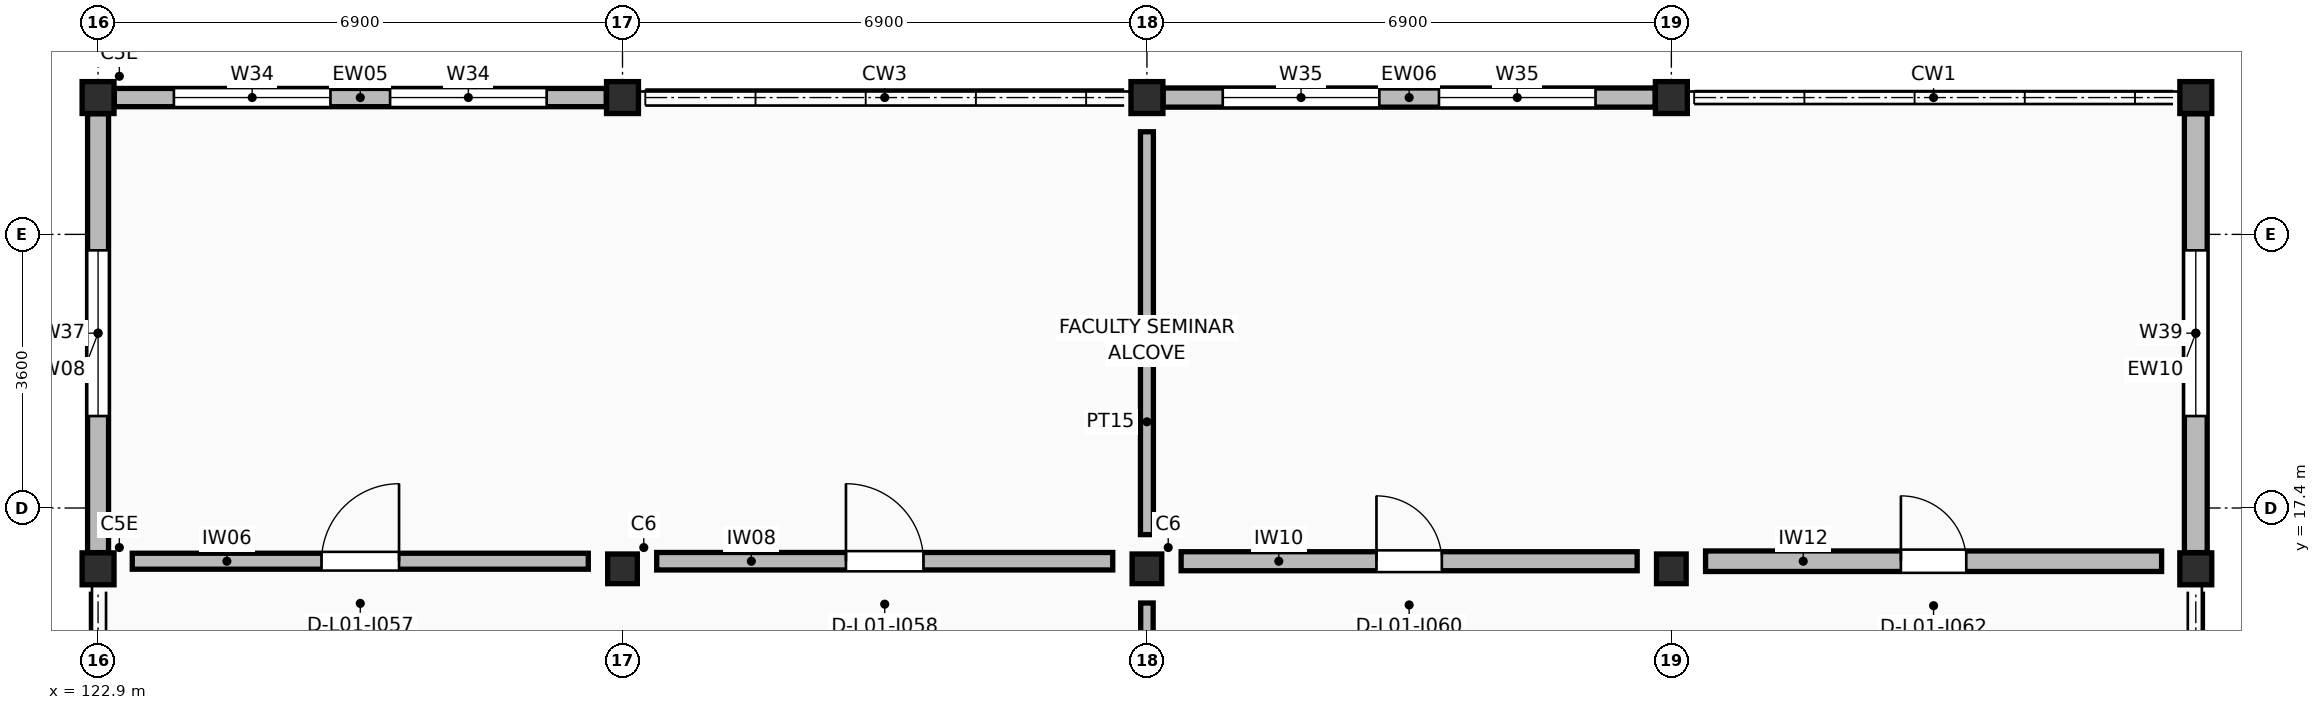
"""IFC4 building model, lengths in metres.
Left out: names, types, materials, properties, quantities, classifications, styles, units other than length and angle.
Written with IfcOpenShell. Run it as: python <this file> out.ifc"""

import sys

from ifc_helpers import new_model, si_unit, direction, frame, frame_2d, origin, origin_2d, place, context, subcontext, project, spatial, rectangle, extrude, element, fill, save


model = new_model("IFC4")
c1 = context("Model", 3, precision=1e-05, world=origin(), true_north=direction((0.0, 1.0)))
c2 = subcontext(c1, "Body", "Model", "MODEL_VIEW")
j1 = project(units=[si_unit("LENGTHUNIT", "METRE"), si_unit("PLANEANGLEUNIT", "RADIAN")], contexts=[c1])
p1 = place(None, origin())
s1 = spatial("IfcSite", under=j1, at=p1, CompositionType="ELEMENT")
p2 = place(p1, origin())
s2 = spatial("IfcBuilding", under=s1, at=p2, CompositionType="ELEMENT")
p3 = place(p2, frame((0.0, 0.0, 4.42)))
s3 = spatial("IfcBuildingStorey", under=s2, at=p3, CompositionType="ELEMENT", Elevation=4.42)
for number, where, z_axis, x_axis in (
    (1, (122.9, 16.6, 0.0), (0.0, 0.0, 1.0), (1.0, 0.0, 0.0)),
    (2, (122.9, 22.8, 0.0), (0.0, 0.0, 1.0), (1.0, 0.0, 0.0)),
):
    element("IfcColumn", number, at=place(p3, frame(where, z_axis=z_axis, x_axis=x_axis)), inside=s3, PredefinedType="COLUMN", context=c2, shape_type="SweptSolid", body=[
        extrude(rectangle(XDim=0.42, YDim=0.42, at=origin_2d()), origin(), (0.0, 0.0, 1.0), 3.74),
    ])
p4 = place(p3, frame((129.8, 16.6, 0.0), z_axis=(0.0, 0.0, 1.0), x_axis=(1.0, 0.0, 0.0)))
e3 = element("IfcColumn", 3, at=p4, inside=s3, PredefinedType="COLUMN", context=c2, shape_type="SweptSolid", body=[
    extrude(rectangle(XDim=0.39, YDim=0.39, at=origin_2d()), origin(), (0.0, 0.0, 1.0), 3.74),
])
p5 = place(p3, frame((129.8, 22.8, 0.0), z_axis=(0.0, 0.0, 1.0), x_axis=(1.0, 0.0, 0.0)))
e4 = element("IfcColumn", 4, at=p5, inside=s3, PredefinedType="COLUMN", context=c2, shape_type="SweptSolid", body=[
    extrude(rectangle(XDim=0.42, YDim=0.42, at=origin_2d()), origin(), (0.0, 0.0, 1.0), 3.74),
])
p6 = place(p3, frame((136.7, 16.6, 0.0), z_axis=(0.0, 0.0, 1.0), x_axis=(1.0, 0.0, 0.0)))
e5 = element("IfcColumn", 5, at=p6, inside=s3, PredefinedType="COLUMN", context=c2, shape_type="SweptSolid", body=[
    extrude(rectangle(XDim=0.39, YDim=0.39, at=origin_2d()), origin(), (0.0, 0.0, 1.0), 3.74),
])
p7 = place(p3, frame((136.7, 22.8, 0.0), z_axis=(0.0, 0.0, 1.0), x_axis=(1.0, 0.0, 0.0)))
e6 = element("IfcColumn", 6, at=p7, inside=s3, PredefinedType="COLUMN", context=c2, shape_type="SweptSolid", body=[
    extrude(rectangle(XDim=0.42, YDim=0.42, at=origin_2d()), origin(), (0.0, 0.0, 1.0), 3.74),
])
p8 = place(p3, frame((143.6, 16.6, 0.0), z_axis=(0.0, 0.0, 1.0), x_axis=(1.0, 0.0, 0.0)))
e7 = element("IfcColumn", 7, at=p8, inside=s3, PredefinedType="COLUMN", context=c2, shape_type="SweptSolid", body=[
    extrude(rectangle(XDim=0.39, YDim=0.39, at=origin_2d()), origin(), (0.0, 0.0, 1.0), 3.74),
])
for number, where, z_axis, x_axis in (
    (8, (143.6, 22.8, 0.0), (0.0, 0.0, 1.0), (1.0, 0.0, 0.0)),
    (9, (150.5, 16.6, 0.0), (0.0, 0.0, 1.0), (1.0, 0.0, 0.0)),
    (10, (150.5, 22.8, 0.0), (0.0, 0.0, 1.0), (1.0, 0.0, 0.0)),
):
    element("IfcColumn", number, at=place(p3, frame(where, z_axis=z_axis, x_axis=x_axis)), inside=s3, PredefinedType="COLUMN", context=c2, shape_type="SweptSolid", body=[
        extrude(rectangle(XDim=0.42, YDim=0.42, at=origin_2d()), origin(), (0.0, 0.0, 1.0), 3.74),
    ])
p9 = place(p3, frame((123.113, 22.8, 0.0), z_axis=(0.0, 0.0, 1.0), x_axis=(1.0, 0.0, 0.0)))
e11 = element("IfcWall", 11, at=p9, inside=s3, PredefinedType="STANDARD", context=c2, shape_type="SweptSolid", body=[
    extrude(rectangle(XDim=6.474, YDim=0.24, at=frame_2d((3.237, 0.0))), origin(), (0.0, 0.0, 1.0), 2.78),
])
p10 = place(p9, frame((0.785, 0.0, 0.95)))
e12 = element("IfcOpeningElement", 12, at=p10, cuts=e11, PredefinedType="OPENING", context=c2, shape_type="SweptSolid", body=[
    extrude(rectangle(XDim=2.06, YDim=1.3, at=frame_2d((1.03, 0.65))), frame((0.0, 0.13, 0.0), z_axis=(0.0, -1.0, 0.0), x_axis=(1.0, 0.0, 0.0)), (0.0, 0.0, 1.0), 0.26),
])
p11 = place(p9, frame((3.629, 0.0, 0.95)))
e13 = element("IfcOpeningElement", 13, at=p11, cuts=e11, PredefinedType="OPENING", context=c2, shape_type="SweptSolid", body=[
    extrude(rectangle(XDim=2.06, YDim=1.3, at=frame_2d((1.03, 0.65))), frame((0.0, 0.13, 0.0), z_axis=(0.0, -1.0, 0.0), x_axis=(1.0, 0.0, 0.0)), (0.0, 0.0, 1.0), 0.26),
])
p12 = place(p3, frame((136.913, 22.8, 0.0), z_axis=(0.0, 0.0, 1.0), x_axis=(1.0, 0.0, 0.0)))
e14 = element("IfcWall", 14, at=p12, inside=s3, PredefinedType="STANDARD", context=c2, shape_type="SweptSolid", body=[
    extrude(rectangle(XDim=6.474, YDim=0.252, at=frame_2d((3.237, 0.0))), origin(), (0.0, 0.0, 1.0), 2.78),
])
p13 = place(p12, frame((0.785, 0.0, 0.95)))
e15 = element("IfcOpeningElement", 15, at=p13, cuts=e14, PredefinedType="OPENING", context=c2, shape_type="SweptSolid", body=[
    extrude(rectangle(XDim=2.06, YDim=1.45, at=frame_2d((1.03, 0.725))), frame((0.0, 0.136, 0.0), z_axis=(0.0, -1.0, 0.0), x_axis=(1.0, 0.0, 0.0)), (0.0, 0.0, 1.0), 0.272),
])
p14 = place(p12, frame((3.629, 0.0, 0.95)))
e16 = element("IfcOpeningElement", 16, at=p14, cuts=e14, PredefinedType="OPENING", context=c2, shape_type="SweptSolid", body=[
    extrude(rectangle(XDim=2.06, YDim=1.45, at=frame_2d((1.03, 0.725))), frame((0.0, 0.136, 0.0), z_axis=(0.0, -1.0, 0.0), x_axis=(1.0, 0.0, 0.0)), (0.0, 0.0, 1.0), 0.272),
])
p15 = place(p3, frame((122.9, 16.813, 0.0), z_axis=(0.0, 0.0, 1.0), x_axis=(0.0, 1.0, 0.0)))
e17 = element("IfcWall", 17, at=p15, inside=s3, PredefinedType="STANDARD", context=c2, shape_type="SweptSolid", body=[
    extrude(rectangle(XDim=5.774, YDim=0.276, at=frame_2d((2.887, 0.0))), origin(), (0.0, 0.0, 1.0), 2.78),
])
p16 = place(p15, frame((1.797, 0.0, 0.95)))
e18 = element("IfcOpeningElement", 18, at=p16, cuts=e17, PredefinedType="OPENING", context=c2, shape_type="SweptSolid", body=[
    extrude(rectangle(XDim=2.18, YDim=1.15, at=frame_2d((1.09, 0.575))), frame((0.0, 0.148, 0.0), z_axis=(0.0, -1.0, 0.0), x_axis=(1.0, 0.0, 0.0)), (0.0, 0.0, 1.0), 0.296),
])
p17 = place(p3, frame((150.5, 16.813, 0.0), z_axis=(0.0, 0.0, 1.0), x_axis=(0.0, 1.0, 0.0)))
e19 = element("IfcWall", 19, at=p17, inside=s3, PredefinedType="STANDARD", context=c2, shape_type="SweptSolid", body=[
    extrude(rectangle(XDim=5.774, YDim=0.3, at=frame_2d((2.887, 0.0))), origin(), (0.0, 0.0, 1.0), 2.78),
])
p18 = place(p17, frame((1.797, 0.0, 0.95)))
e20 = element("IfcOpeningElement", 20, at=p18, cuts=e19, PredefinedType="OPENING", context=c2, shape_type="SweptSolid", body=[
    extrude(rectangle(XDim=2.18, YDim=1.45, at=frame_2d((1.09, 0.725))), frame((0.0, 0.16, 0.0), z_axis=(0.0, -1.0, 0.0), x_axis=(1.0, 0.0, 0.0)), (0.0, 0.0, 1.0), 0.32),
])
p19 = place(p3, frame((123.35, 16.7, 0.0), z_axis=(0.0, 0.0, 1.0), x_axis=(1.0, 0.0, 0.0)))
e21 = element("IfcWall", 21, at=p19, inside=s3, PredefinedType="STANDARD", context=c2, shape_type="SweptSolid", body=[
    extrude(rectangle(XDim=6.0, YDim=0.21, at=frame_2d((3.0, 0.0))), origin(), (0.0, 0.0, 1.0), 2.75),
])
p20 = place(p19, frame((2.49, 0.0, 0.0)))
e22 = element("IfcOpeningElement", 22, at=p20, cuts=e21, PredefinedType="OPENING", context=c2, shape_type="SweptSolid", body=[
    extrude(rectangle(XDim=1.02, YDim=2.12, at=frame_2d((0.51, 1.06))), frame((0.0, 0.115, 0.0), z_axis=(0.0, -1.0, 0.0), x_axis=(1.0, 0.0, 0.0)), (0.0, 0.0, 1.0), 0.23),
])
p21 = place(p3, frame((130.25, 16.7, 0.0), z_axis=(0.0, 0.0, 1.0), x_axis=(1.0, 0.0, 0.0)))
e23 = element("IfcWall", 23, at=p21, inside=s3, PredefinedType="STANDARD", context=c2, shape_type="SweptSolid", body=[
    extrude(rectangle(XDim=6.0, YDim=0.23, at=frame_2d((3.0, 0.0))), origin(), (0.0, 0.0, 1.0), 2.75),
])
p22 = place(p21, frame((2.49, 0.0, 0.0)))
e24 = element("IfcOpeningElement", 24, at=p22, cuts=e23, PredefinedType="OPENING", context=c2, shape_type="SweptSolid", body=[
    extrude(rectangle(XDim=1.02, YDim=2.18, at=frame_2d((0.51, 1.09))), frame((0.0, 0.125, 0.0), z_axis=(0.0, -1.0, 0.0), x_axis=(1.0, 0.0, 0.0)), (0.0, 0.0, 1.0), 0.25),
])
p23 = place(p3, frame((137.15, 16.7, 0.0), z_axis=(0.0, 0.0, 1.0), x_axis=(1.0, 0.0, 0.0)))
e25 = element("IfcWall", 25, at=p23, inside=s3, PredefinedType="STANDARD", context=c2, shape_type="SweptSolid", body=[
    extrude(rectangle(XDim=6.0, YDim=0.25, at=frame_2d((3.0, 0.0))), origin(), (0.0, 0.0, 1.0), 2.75),
])
p24 = place(p23, frame((2.57, 0.0, 0.0)))
e26 = element("IfcOpeningElement", 26, at=p24, cuts=e25, PredefinedType="OPENING", context=c2, shape_type="SweptSolid", body=[
    extrude(rectangle(XDim=0.86, YDim=2.06, at=frame_2d((0.43, 1.03))), frame((0.0, 0.135, 0.0), z_axis=(0.0, -1.0, 0.0), x_axis=(1.0, 0.0, 0.0)), (0.0, 0.0, 1.0), 0.27),
])
p25 = place(p3, frame((144.05, 16.7, 0.0), z_axis=(0.0, 0.0, 1.0), x_axis=(1.0, 0.0, 0.0)))
e27 = element("IfcWall", 27, at=p25, inside=s3, PredefinedType="STANDARD", context=c2, shape_type="SweptSolid", body=[
    extrude(rectangle(XDim=6.0, YDim=0.27, at=frame_2d((3.0, 0.0))), origin(), (0.0, 0.0, 1.0), 2.75),
])
p26 = place(p25, frame((2.57, 0.0, 0.0)))
e28 = element("IfcOpeningElement", 28, at=p26, cuts=e27, PredefinedType="OPENING", context=c2, shape_type="SweptSolid", body=[
    extrude(rectangle(XDim=0.86, YDim=2.18, at=frame_2d((0.43, 1.09))), frame((0.0, 0.145, 0.0), z_axis=(0.0, -1.0, 0.0), x_axis=(1.0, 0.0, 0.0)), (0.0, 0.0, 1.0), 0.29),
])
p27 = place(p3, frame((136.7, 10.85, 0.0), z_axis=(0.0, 0.0, 1.0), x_axis=(0.0, 1.0, 0.0)))
e29 = element("IfcWall", 29, at=p27, inside=s3, PredefinedType="PARTITIONING", context=c2, shape_type="SweptSolid", body=[
    extrude(rectangle(XDim=5.3, YDim=0.164, at=frame_2d((2.65, 0.0))), origin(), (0.0, 0.0, 1.0), 2.75),
])
p28 = place(p3, frame((136.7, 17.05, 0.0), z_axis=(0.0, 0.0, 1.0), x_axis=(0.0, 1.0, 0.0)))
e30 = element("IfcWall", 30, at=p28, inside=s3, PredefinedType="PARTITIONING", context=c2, shape_type="SweptSolid", body=[
    extrude(rectangle(XDim=5.3, YDim=0.17, at=frame_2d((2.65, 0.0))), origin(), (0.0, 0.0, 1.0), 2.75),
])
p29 = place(p10, origin())
e31 = element("IfcWindow", 31, at=p29, inside=s3, PartitioningType="SINGLE_PANEL", PredefinedType="WINDOW", context=c2, shape_type="SweptSolid", body=[
    extrude(rectangle(XDim=2.06, YDim=1.3, at=frame_2d((1.03, 0.65))), frame((0.0, 0.03, 0.0), z_axis=(0.0, -1.0, 0.0), x_axis=(1.0, 0.0, 0.0)), (0.0, 0.0, 1.0), 0.06),
])
fill(e12, e31)
p30 = place(p11, origin())
e32 = element("IfcWindow", 32, at=p30, inside=s3, PartitioningType="SINGLE_PANEL", PredefinedType="WINDOW", context=c2, shape_type="SweptSolid", body=[
    extrude(rectangle(XDim=2.06, YDim=1.3, at=frame_2d((1.03, 0.65))), frame((0.0, 0.03, 0.0), z_axis=(0.0, -1.0, 0.0), x_axis=(1.0, 0.0, 0.0)), (0.0, 0.0, 1.0), 0.06),
])
fill(e13, e32)
p31 = place(p13, origin())
e33 = element("IfcWindow", 33, at=p31, inside=s3, PartitioningType="SINGLE_PANEL", PredefinedType="WINDOW", context=c2, shape_type="SweptSolid", body=[
    extrude(rectangle(XDim=2.06, YDim=1.45, at=frame_2d((1.03, 0.725))), frame((0.0, 0.03, 0.0), z_axis=(0.0, -1.0, 0.0), x_axis=(1.0, 0.0, 0.0)), (0.0, 0.0, 1.0), 0.06),
])
fill(e15, e33)
p32 = place(p14, origin())
e34 = element("IfcWindow", 34, at=p32, inside=s3, PartitioningType="SINGLE_PANEL", PredefinedType="WINDOW", context=c2, shape_type="SweptSolid", body=[
    extrude(rectangle(XDim=2.06, YDim=1.45, at=frame_2d((1.03, 0.725))), frame((0.0, 0.03, 0.0), z_axis=(0.0, -1.0, 0.0), x_axis=(1.0, 0.0, 0.0)), (0.0, 0.0, 1.0), 0.06),
])
fill(e16, e34)
p33 = place(p16, origin())
e35 = element("IfcWindow", 35, at=p33, inside=s3, PartitioningType="SINGLE_PANEL", PredefinedType="WINDOW", context=c2, shape_type="SweptSolid", body=[
    extrude(rectangle(XDim=2.18, YDim=1.15, at=frame_2d((1.09, 0.575))), frame((0.0, 0.03, 0.0), z_axis=(0.0, -1.0, 0.0), x_axis=(1.0, 0.0, 0.0)), (0.0, 0.0, 1.0), 0.06),
])
fill(e18, e35)
p34 = place(p18, origin())
e36 = element("IfcWindow", 36, at=p34, inside=s3, PartitioningType="SINGLE_PANEL", PredefinedType="WINDOW", context=c2, shape_type="SweptSolid", body=[
    extrude(rectangle(XDim=2.18, YDim=1.45, at=frame_2d((1.09, 0.725))), frame((0.0, 0.03, 0.0), z_axis=(0.0, -1.0, 0.0), x_axis=(1.0, 0.0, 0.0)), (0.0, 0.0, 1.0), 0.06),
])
fill(e20, e36)
p35 = place(p20, frame((1.02, 0.0, 0.0), z_axis=(0.0, 0.0, 1.0), x_axis=(-1.0, 0.0, 0.0)))
e37 = element("IfcDoor", 37, at=p35, inside=s3, OperationType="SINGLE_SWING_RIGHT", PredefinedType="DOOR", context=c2, shape_type="SweptSolid", body=[
    extrude(rectangle(XDim=1.02, YDim=2.12, at=frame_2d((0.51, 1.06))), frame((0.0, 0.025, 0.0), z_axis=(0.0, -1.0, 0.0), x_axis=(1.0, 0.0, 0.0)), (0.0, 0.0, 1.0), 0.05),
])
fill(e22, e37)
p36 = place(p22, frame((1.02, 0.0, 0.0), z_axis=(0.0, 0.0, 1.0), x_axis=(-1.0, 0.0, 0.0)))
e38 = element("IfcDoor", 38, at=p36, inside=s3, OperationType="SINGLE_SWING_LEFT", PredefinedType="DOOR", context=c2, shape_type="SweptSolid", body=[
    extrude(rectangle(XDim=1.02, YDim=2.18, at=frame_2d((0.51, 1.09))), frame((0.0, 0.025, 0.0), z_axis=(0.0, -1.0, 0.0), x_axis=(1.0, 0.0, 0.0)), (0.0, 0.0, 1.0), 0.05),
])
fill(e24, e38)
p37 = place(p24, frame((0.86, 0.0, 0.0), z_axis=(0.0, 0.0, 1.0), x_axis=(-1.0, 0.0, 0.0)))
e39 = element("IfcDoor", 39, at=p37, inside=s3, OperationType="SINGLE_SWING_LEFT", PredefinedType="DOOR", context=c2, shape_type="SweptSolid", body=[
    extrude(rectangle(XDim=0.86, YDim=2.06, at=frame_2d((0.43, 1.03))), frame((0.0, 0.025, 0.0), z_axis=(0.0, -1.0, 0.0), x_axis=(1.0, 0.0, 0.0)), (0.0, 0.0, 1.0), 0.05),
])
fill(e26, e39)
p38 = place(p26, frame((0.86, 0.0, 0.0), z_axis=(0.0, 0.0, 1.0), x_axis=(-1.0, 0.0, 0.0)))
e40 = element("IfcDoor", 40, at=p38, inside=s3, OperationType="SINGLE_SWING_LEFT", PredefinedType="DOOR", context=c2, shape_type="SweptSolid", body=[
    extrude(rectangle(XDim=0.86, YDim=2.18, at=frame_2d((0.43, 1.09))), frame((0.0, 0.025, 0.0), z_axis=(0.0, -1.0, 0.0), x_axis=(1.0, 0.0, 0.0)), (0.0, 0.0, 1.0), 0.05),
])
fill(e28, e40)
save(model, sys.argv[1])
